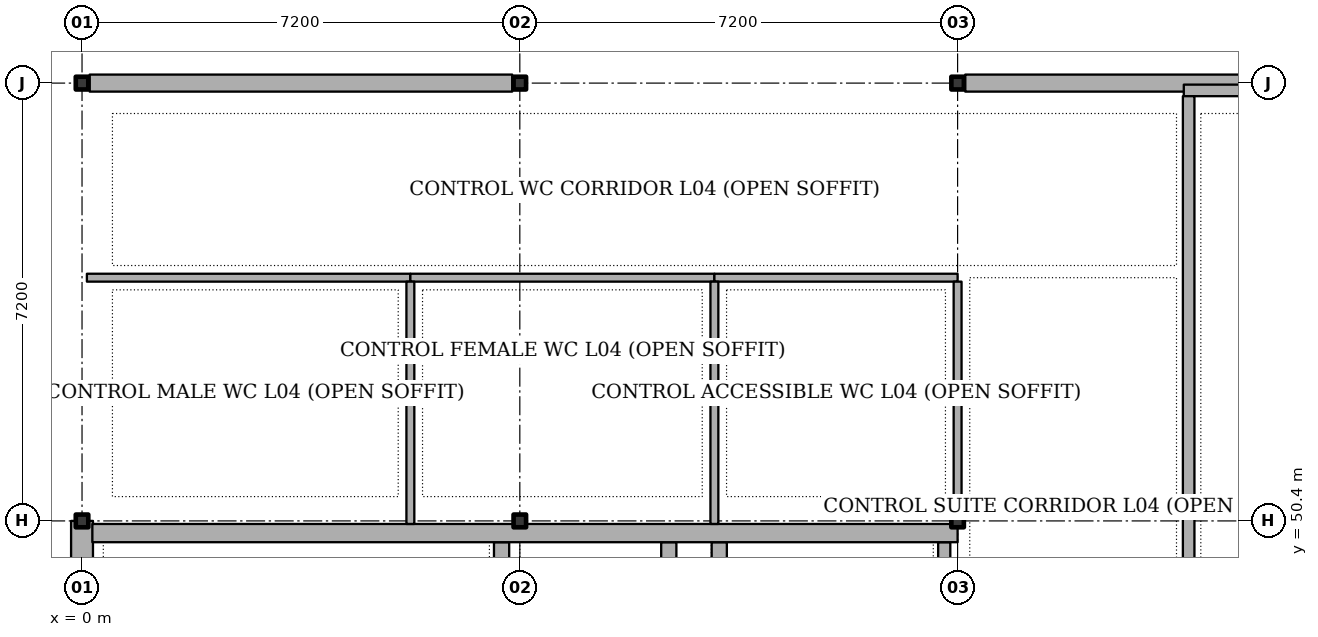
"""IFC4 building model, lengths in metres.
Left out: names, types, materials, properties, quantities, classifications, styles, units other than length and angle.
Written with IfcOpenShell. Run it as: python <this file> out.ifc"""

import sys

from ifc_helpers import new_model, si_unit, direction, frame, frame_2d, origin, origin_2d, place, context, subcontext, project, spatial, rectangle, i_section, extrude, element, fill, save


model = new_model("IFC4")
c1 = context("Model", 3, precision=1e-05, world=origin(), true_north=direction((0.0, 1.0)))
c2 = subcontext(c1, "Body", "Model", "MODEL_VIEW")
j1 = project(units=[si_unit("LENGTHUNIT", "METRE"), si_unit("PLANEANGLEUNIT", "RADIAN")], contexts=[c1])
p1 = place(None, origin())
s1 = spatial("IfcSite", under=j1, at=p1, CompositionType="ELEMENT")
p2 = place(p1, origin())
s2 = spatial("IfcBuilding", under=s1, at=p2, CompositionType="ELEMENT")
p3 = place(p2, frame((0.0, 0.0, 18.9)))
s3 = spatial("IfcBuildingStorey", under=s2, at=p3, CompositionType="ELEMENT", Elevation=18.9)
for number, where, z_axis, x_axis in (
    (1, (0.0, 50.4, 0.0), (0.0, 0.0, 1.0), (1.0, 0.0, 0.0)),
    (2, (0.0, 57.6, 0.0), (0.0, 0.0, 1.0), (1.0, 0.0, 0.0)),
    (3, (7.2, 50.4, 0.0), (0.0, 0.0, 1.0), (1.0, 0.0, 0.0)),
    (4, (7.2, 57.6, 0.0), (0.0, 0.0, 1.0), (1.0, 0.0, 0.0)),
    (5, (14.4, 50.4, 0.0), (0.0, 0.0, 1.0), (1.0, 0.0, 0.0)),
    (6, (14.4, 57.6, 0.0), (0.0, 0.0, 1.0), (1.0, 0.0, 0.0)),
):
    element("IfcColumn", number, at=place(p3, frame(where, z_axis=z_axis, x_axis=x_axis)), inside=s3, PredefinedType="COLUMN", context=c2, shape_type="SweptSolid", body=[
        extrude(i_section(OverallWidth=0.206, OverallDepth=0.21, WebThickness=0.01, FlangeThickness=0.014, FilletRadius=0.01, at=origin_2d()), origin(), (0.0, 0.0, 1.0), 4.5),
    ])
p4 = place(p3, frame((0.0, 43.2, 0.0), z_axis=(0.0, 0.0, 1.0), x_axis=(0.0, 1.0, 0.0)))
e7 = element("IfcWall", 7, at=p4, inside=s3, PredefinedType="SHEAR", context=c2, shape_type="SweptSolid", body=[
    extrude(rectangle(XDim=7.2, YDim=0.36, at=frame_2d((3.6, 0.0))), origin(), (0.0, 0.0, 1.0), 3.85),
])
p5 = place(p3, frame((0.125, 57.6, 0.0), z_axis=(0.0, 0.0, 1.0), x_axis=(1.0, 0.0, 0.0)))
e8 = element("IfcWall", 8, at=p5, inside=s3, PredefinedType="SOLIDWALL", context=c2, shape_type="SweptSolid", body=[
    extrude(rectangle(XDim=6.95, YDim=0.28, at=frame_2d((3.475, 0.0))), origin(), (0.0, 0.0, 1.0), 3.658),
])
p6 = place(p3, frame((14.525, 57.6, 0.0), z_axis=(0.0, 0.0, 1.0), x_axis=(1.0, 0.0, 0.0)))
e9 = element("IfcWall", 9, at=p6, inside=s3, PredefinedType="SOLIDWALL", context=c2, shape_type="SweptSolid", body=[
    extrude(rectangle(XDim=6.95, YDim=0.28, at=frame_2d((3.475, 0.0))), origin(), (0.0, 0.0, 1.0), 3.658),
])
p7 = place(p6, frame((0.678, 0.0, 1.05)))
e10 = element("IfcOpeningElement", 10, at=p7, cuts=e9, PredefinedType="OPENING", context=c2, shape_type="SweptSolid", body=[
    extrude(rectangle(XDim=2.47, YDim=1.5, at=frame_2d((1.235, 0.75))), frame((0.0, 0.15, 0.0), z_axis=(0.0, -1.0, 0.0), x_axis=(1.0, 0.0, 0.0)), (0.0, 0.0, 1.0), 0.3),
])
p8 = place(p3, frame((18.12, 57.48, 4.5), z_axis=(0.0, 0.0, 1.0), x_axis=(1.0, 0.0, 0.0)))
e11 = element("IfcWall", 11, at=p8, inside=s3, PredefinedType="PARAPET", context=c2, shape_type="SweptSolid", body=[
    extrude(rectangle(XDim=17.76, YDim=0.19, at=frame_2d((8.88, 0.0))), origin(), (0.0, 0.0, 1.0), 0.9),
])
p9 = place(p3, frame((6.9, 43.55, 0.0), z_axis=(0.0, 0.0, 1.0), x_axis=(0.0, 1.0, 0.0)))
e12 = element("IfcWall", 12, at=p9, inside=s3, PredefinedType="SHEAR", context=c2, shape_type="SweptSolid", body=[
    extrude(rectangle(XDim=6.5, YDim=0.25, at=frame_2d((3.25, 0.0))), origin(), (0.0, 0.0, 1.0), 3.65),
])
p10 = place(p9, frame((0.95, 0.0, 0.0)))
e13 = element("IfcOpeningElement", 13, at=p10, cuts=e12, PredefinedType="OPENING", context=c2, shape_type="SweptSolid", body=[
    extrude(rectangle(XDim=1.35, YDim=2.15, at=frame_2d((0.675, 1.075))), frame((0.0, 0.135, 0.0), z_axis=(0.0, -1.0, 0.0), x_axis=(1.0, 0.0, 0.0)), (0.0, 0.0, 1.0), 0.27),
])
p11 = place(p3, frame((9.65, 47.085, 0.0), z_axis=(0.0, 0.0, 1.0), x_axis=(0.0, 1.0, 0.0)))
e14 = element("IfcWall", 14, at=p11, inside=s3, PredefinedType="SHEAR", context=c2, shape_type="SweptSolid", body=[
    extrude(rectangle(XDim=2.965, YDim=0.25, at=frame_2d((1.482, 0.0))), origin(), (0.0, 0.0, 1.0), 3.65),
])
p12 = place(p3, frame((10.48, 47.085, 0.0), z_axis=(0.0, 0.0, 1.0), x_axis=(0.0, 1.0, 0.0)))
e15 = element("IfcWall", 15, at=p12, inside=s3, PredefinedType="SHEAR", context=c2, shape_type="SweptSolid", body=[
    extrude(rectangle(XDim=2.965, YDim=0.25, at=frame_2d((1.482, 0.0))), origin(), (0.0, 0.0, 1.0), 3.65),
])
p13 = place(p12, frame((0.9, 0.0, 0.0)))
e16 = element("IfcOpeningElement", 16, at=p13, cuts=e15, PredefinedType="OPENING", context=c2, shape_type="SweptSolid", body=[
    extrude(rectangle(XDim=0.92, YDim=2.05, at=frame_2d((0.46, 1.025))), frame((0.0, 0.135, 0.0), z_axis=(0.0, -1.0, 0.0), x_axis=(1.0, 0.0, 0.0)), (0.0, 0.0, 1.0), 0.27),
])
p14 = place(p3, frame((14.18, 43.55, 0.0), z_axis=(0.0, 0.0, 1.0), x_axis=(0.0, 1.0, 0.0)))
e17 = element("IfcWall", 17, at=p14, inside=s3, PredefinedType="SOLIDWALL", context=c2, shape_type="SweptSolid", body=[
    extrude(rectangle(XDim=6.5, YDim=0.2, at=frame_2d((3.25, 0.0))), origin(), (0.0, 0.0, 1.0), 3.65),
])
p15 = place(p14, frame((2.5, 0.0, 0.0)))
e18 = element("IfcOpeningElement", 18, at=p15, cuts=e17, PredefinedType="OPENING", context=c2, shape_type="SweptSolid", body=[
    extrude(rectangle(XDim=1.5, YDim=2.15, at=frame_2d((0.75, 1.075))), frame((0.0, 0.11, 0.0), z_axis=(0.0, -1.0, 0.0), x_axis=(1.0, 0.0, 0.0)), (0.0, 0.0, 1.0), 0.22),
])
p16 = place(p3, frame((0.17, 50.2, 0.0), z_axis=(0.0, 0.0, 1.0), x_axis=(1.0, 0.0, 0.0)))
e19 = element("IfcWall", 19, at=p16, inside=s3, PredefinedType="SHEAR", context=c2, shape_type="SweptSolid", body=[
    extrude(rectangle(XDim=14.23, YDim=0.3, at=frame_2d((7.115, 0.0))), origin(), (0.0, 0.0, 1.0), 3.65),
])
p17 = place(p3, frame((18.2, 43.4, 0.0), z_axis=(0.0, 0.0, 1.0), x_axis=(0.0, 1.0, 0.0)))
e20 = element("IfcWall", 20, at=p17, inside=s3, PredefinedType="PARTITIONING", context=c2, shape_type="SweptSolid", body=[
    extrude(rectangle(XDim=13.985, YDim=0.19, at=frame_2d((6.993, 0.0))), origin(), (0.0, 0.0, 1.0), 3.55),
])
p18 = place(p17, frame((2.648, 0.0, 0.0)))
e21 = element("IfcOpeningElement", 21, at=p18, cuts=e20, PredefinedType="OPENING", context=c2, shape_type="SweptSolid", body=[
    extrude(rectangle(XDim=1.25, YDim=2.15, at=frame_2d((0.625, 1.075))), frame((0.0, 0.105, 0.0), z_axis=(0.0, -1.0, 0.0), x_axis=(1.0, 0.0, 0.0)), (0.0, 0.0, 1.0), 0.21),
])
p19 = place(p3, frame((0.08, 54.4, 0.0), z_axis=(0.0, 0.0, 1.0), x_axis=(1.0, 0.0, 0.0)))
e22 = element("IfcWall", 22, at=p19, inside=s3, PredefinedType="PARTITIONING", context=c2, shape_type="SweptSolid", body=[
    extrude(rectangle(XDim=5.32, YDim=0.13, at=frame_2d((2.66, 0.0))), origin(), (0.0, 0.0, 1.0), 3.55),
])
p20 = place(p19, frame((3.21, 0.0, 0.0)))
e23 = element("IfcOpeningElement", 23, at=p20, cuts=e22, PredefinedType="OPENING", context=c2, shape_type="SweptSolid", body=[
    extrude(rectangle(XDim=0.9, YDim=2.05, at=frame_2d((0.45, 1.025))), frame((0.0, 0.075, 0.0), z_axis=(0.0, -1.0, 0.0), x_axis=(1.0, 0.0, 0.0)), (0.0, 0.0, 1.0), 0.15),
])
p21 = place(p3, frame((5.4, 54.4, 0.0), z_axis=(0.0, 0.0, 1.0), x_axis=(1.0, 0.0, 0.0)))
e24 = element("IfcWall", 24, at=p21, inside=s3, PredefinedType="PARTITIONING", context=c2, shape_type="SweptSolid", body=[
    extrude(rectangle(XDim=5.0, YDim=0.13, at=frame_2d((2.5, 0.0))), origin(), (0.0, 0.0, 1.0), 3.55),
])
p22 = place(p21, frame((3.78, 0.0, 0.0)))
e25 = element("IfcOpeningElement", 25, at=p22, cuts=e24, PredefinedType="OPENING", context=c2, shape_type="SweptSolid", body=[
    extrude(rectangle(XDim=0.9, YDim=2.05, at=frame_2d((0.45, 1.025))), frame((0.0, 0.075, 0.0), z_axis=(0.0, -1.0, 0.0), x_axis=(1.0, 0.0, 0.0)), (0.0, 0.0, 1.0), 0.15),
])
p23 = place(p3, frame((10.4, 54.4, 0.0), z_axis=(0.0, 0.0, 1.0), x_axis=(1.0, 0.0, 0.0)))
e26 = element("IfcWall", 26, at=p23, inside=s3, PredefinedType="PARTITIONING", context=c2, shape_type="SweptSolid", body=[
    extrude(rectangle(XDim=4.0, YDim=0.13, at=frame_2d((2.0, 0.0))), origin(), (0.0, 0.0, 1.0), 3.55),
])
p24 = place(p23, frame((0.32, 0.0, 0.0)))
e27 = element("IfcOpeningElement", 27, at=p24, cuts=e26, PredefinedType="OPENING", context=c2, shape_type="SweptSolid", body=[
    extrude(rectangle(XDim=0.98, YDim=2.1, at=frame_2d((0.49, 1.05))), frame((0.0, 0.075, 0.0), z_axis=(0.0, -1.0, 0.0), x_axis=(1.0, 0.0, 0.0)), (0.0, 0.0, 1.0), 0.15),
])
for number, where, z_axis, x_axis in (
    (28, (5.4, 50.35, 0.0), (0.0, 0.0, 1.0), (0.0, 1.0, 0.0)),
    (29, (10.4, 50.35, 0.0), (0.0, 0.0, 1.0), (0.0, 1.0, 0.0)),
):
    element("IfcWall", number, at=place(p3, frame(where, z_axis=z_axis, x_axis=x_axis)), inside=s3, PredefinedType="PARTITIONING", context=c2, shape_type="SweptSolid", body=[
        extrude(rectangle(XDim=3.985, YDim=0.13, at=frame_2d((1.992, 0.0))), origin(), (0.0, 0.0, 1.0), 3.55),
    ])
p25 = place(p3, frame((14.4, 50.507, 0.0), z_axis=(0.0, 0.0, 1.0), x_axis=(0.0, 1.0, 0.0)))
e30 = element("IfcWall", 30, at=p25, inside=s3, PredefinedType="PARTITIONING", context=c2, shape_type="SweptSolid", body=[
    extrude(rectangle(XDim=3.828, YDim=0.13, at=frame_2d((1.914, 0.0))), origin(), (0.0, 0.0, 1.0), 3.55),
])
p26 = place(p7, origin())
e31 = element("IfcWindow", 31, at=p26, inside=s3, PartitioningType="SINGLE_PANEL", PredefinedType="WINDOW", context=c2, shape_type="SweptSolid", body=[
    extrude(rectangle(XDim=2.47, YDim=1.5, at=frame_2d((1.235, 0.75))), frame((0.0, 0.03, 0.0), z_axis=(0.0, -1.0, 0.0), x_axis=(1.0, 0.0, 0.0)), (0.0, 0.0, 1.0), 0.06),
])
fill(e10, e31)
p27 = place(p20, origin())
e32 = element("IfcDoor", 32, at=p27, inside=s3, OperationType="SINGLE_SWING_RIGHT", PredefinedType="DOOR", context=c2, shape_type="SweptSolid", body=[
    extrude(rectangle(XDim=0.9, YDim=2.05, at=frame_2d((0.45, 1.025))), frame((0.0, 0.025, 0.0), z_axis=(0.0, -1.0, 0.0), x_axis=(1.0, 0.0, 0.0)), (0.0, 0.0, 1.0), 0.05),
])
fill(e23, e32)
p28 = place(p22, origin())
e33 = element("IfcDoor", 33, at=p28, inside=s3, OperationType="SINGLE_SWING_LEFT", PredefinedType="DOOR", context=c2, shape_type="SweptSolid", body=[
    extrude(rectangle(XDim=0.9, YDim=2.05, at=frame_2d((0.45, 1.025))), frame((0.0, 0.025, 0.0), z_axis=(0.0, -1.0, 0.0), x_axis=(1.0, 0.0, 0.0)), (0.0, 0.0, 1.0), 0.05),
])
fill(e25, e33)
p29 = place(p24, origin())
e34 = element("IfcDoor", 34, at=p29, inside=s3, OperationType="SINGLE_SWING_RIGHT", PredefinedType="DOOR", context=c2, shape_type="SweptSolid", body=[
    extrude(rectangle(XDim=0.98, YDim=2.1, at=frame_2d((0.49, 1.05))), frame((0.0, 0.025, 0.0), z_axis=(0.0, -1.0, 0.0), x_axis=(1.0, 0.0, 0.0)), (0.0, 0.0, 1.0), 0.05),
])
fill(e27, e34)
save(model, sys.argv[1])
